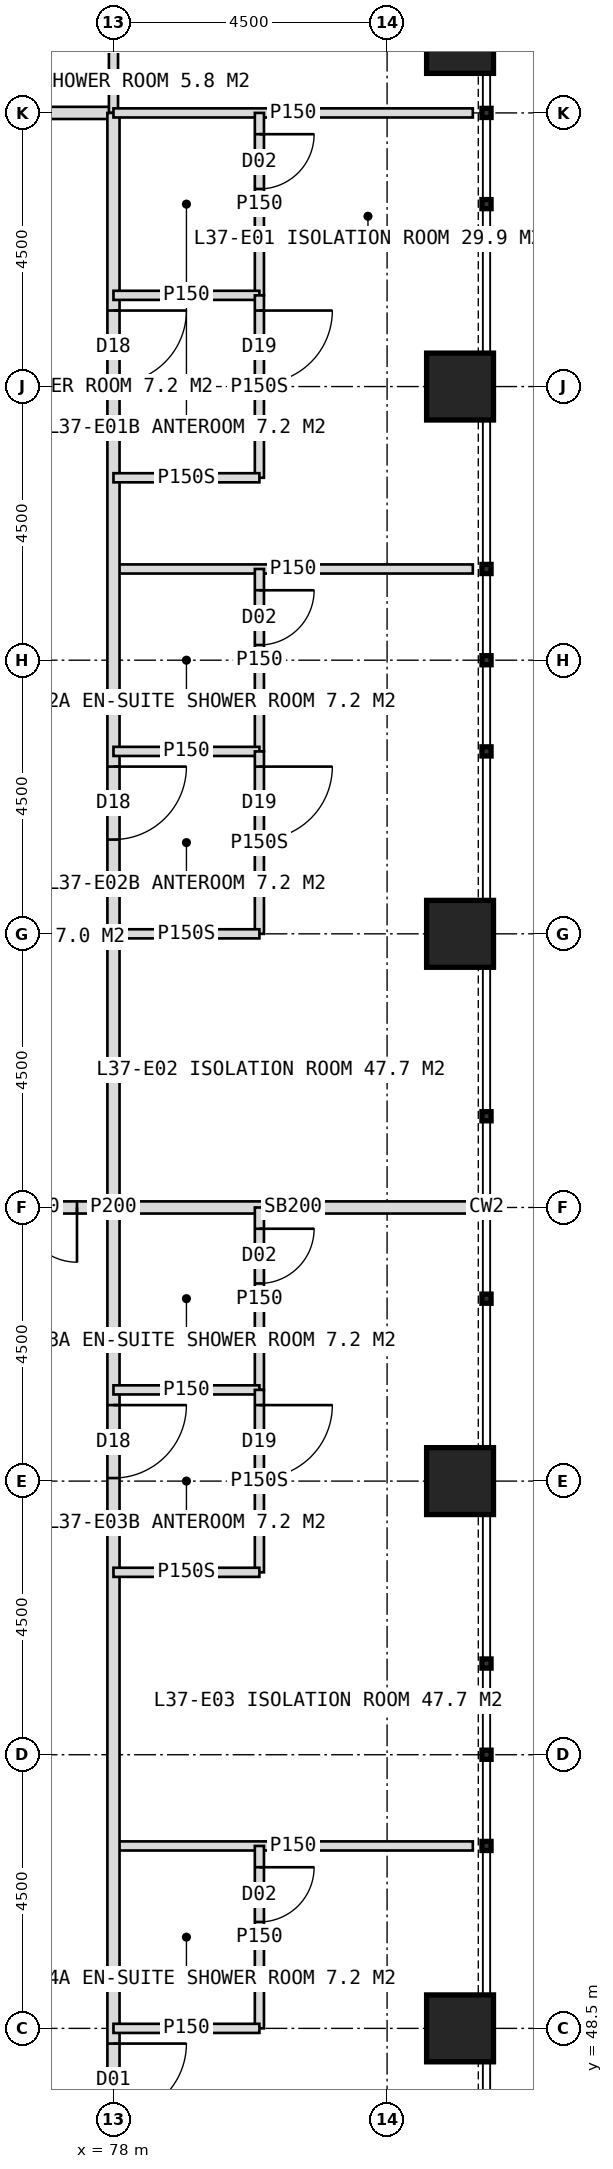
"""IFC4 building model, lengths in metres.
Left out: names, types, materials, properties, quantities, classifications, styles, units other than length and angle.
Written with IfcOpenShell. Run it as: python <this file> out.ifc"""

import sys

from ifc_helpers import new_model, si_unit, direction, frame, frame_2d, origin, origin_2d, place, context, subcontext, project, spatial, rectangle, hollow_rectangle, extrude, element, fill, save


model = new_model("IFC4")
c1 = context("Model", 3, precision=1e-05, world=origin(), true_north=direction((0.0, 1.0)))
c2 = subcontext(c1, "Body", "Model", "MODEL_VIEW")
j1 = project(units=[si_unit("LENGTHUNIT", "METRE"), si_unit("PLANEANGLEUNIT", "RADIAN")], contexts=[c1])
p1 = place(None, origin())
s1 = spatial("IfcSite", under=j1, at=p1, CompositionType="ELEMENT")
p2 = place(p1, origin())
s2 = spatial("IfcBuilding", under=s1, at=p2, CompositionType="ELEMENT")
p3 = place(p2, frame((0.0, 0.0, 156.0)))
s3 = spatial("IfcBuildingStorey", under=s2, at=p3, CompositionType="ELEMENT", Elevation=156.0)
for number, where, z_axis, x_axis in (
    (1, (83.7, 48.5, 0.0), (0.0, 0.0, 1.0), (1.0, 0.0, 0.0)),
    (2, (83.7, 57.5, 0.0), (0.0, 0.0, 1.0), (1.0, 0.0, 0.0)),
    (3, (83.7, 66.5, 0.0), (0.0, 0.0, 1.0), (1.0, 0.0, 0.0)),
    (4, (83.7, 75.5, 0.0), (0.0, 0.0, 1.0), (1.0, 0.0, 0.0)),
    (5, (83.7, 81.2, 0.0), (0.0, 0.0, 1.0), (1.0, 0.0, 0.0)),
):
    element("IfcColumn", number, at=place(p3, frame(where, z_axis=z_axis, x_axis=x_axis)), inside=s3, PredefinedType="COLUMN", context=c2, shape_type="SweptSolid", body=[
        extrude(hollow_rectangle(XDim=1.1, YDim=1.1, WallThickness=0.1, at=origin_2d()), origin(), (0.0, 0.0, 1.0), 4.0),
    ])
p4 = place(p3, frame((42.0, 80.0, 0.0), z_axis=(0.0, 0.0, 1.0), x_axis=(1.0, 0.0, 0.0)))
e6 = element("IfcWall", 6, at=p4, inside=s3, PredefinedType="PARTITIONING", context=c2, shape_type="SweptSolid", body=[
    extrude(rectangle(XDim=36.0, YDim=0.2, at=frame_2d((18.0, 0.0))), origin(), (0.0, 0.0, 1.0), 3.75),
])
p5 = place(p4, frame((3.25, 0.0, 0.0)))
e7 = element("IfcOpeningElement", 7, at=p5, cuts=e6, PredefinedType="OPENING", context=c2, shape_type="SweptSolid", body=[
    extrude(rectangle(XDim=1.2, YDim=2.2, at=frame_2d((0.6, 1.1))), frame((0.0, 0.11, 0.0), z_axis=(0.0, -1.0, 0.0), x_axis=(1.0, 0.0, 0.0)), (0.0, 0.0, 1.0), 0.22),
])
p6 = place(p4, frame((13.75, 0.0, 0.0)))
e8 = element("IfcOpeningElement", 8, at=p6, cuts=e6, PredefinedType="OPENING", context=c2, shape_type="SweptSolid", body=[
    extrude(rectangle(XDim=1.0, YDim=2.1, at=frame_2d((0.5, 1.05))), frame((0.0, 0.11, 0.0), z_axis=(0.0, -1.0, 0.0), x_axis=(1.0, 0.0, 0.0)), (0.0, 0.0, 1.0), 0.22),
])
p7 = place(p4, frame((22.15, 0.0, 0.0)))
e9 = element("IfcOpeningElement", 9, at=p7, cuts=e6, PredefinedType="OPENING", context=c2, shape_type="SweptSolid", body=[
    extrude(rectangle(XDim=1.2, YDim=2.2, at=frame_2d((0.6, 1.1))), frame((0.0, 0.11, 0.0), z_axis=(0.0, -1.0, 0.0), x_axis=(1.0, 0.0, 0.0)), (0.0, 0.0, 1.0), 0.22),
])
p8 = place(p3, frame((78.0, 80.0, 0.0), z_axis=(0.0, 0.0, 1.0), x_axis=(0.0, 1.0, 0.0)))
e10 = element("IfcWall", 10, at=p8, inside=s3, PredefinedType="PARTITIONING", context=c2, shape_type="SweptSolid", body=[
    extrude(rectangle(XDim=2.4, YDim=0.15, at=frame_2d((1.2, 0.0))), origin(), (0.0, 0.0, 1.0), 3.75),
])
p9 = place(p3, frame((78.0, 72.5, 0.0), z_axis=(0.0, 0.0, 1.0), x_axis=(1.0, 0.0, 0.0)))
e11 = element("IfcWall", 11, at=p9, inside=s3, PredefinedType="PARTITIONING", context=c2, shape_type="SweptSolid", body=[
    extrude(rectangle(XDim=5.91, YDim=0.15, at=frame_2d((2.955, 0.0))), origin(), (0.0, 0.0, 1.0), 3.75),
])
p10 = place(p3, frame((78.0, 62.0, 0.0), z_axis=(0.0, 0.0, 1.0), x_axis=(1.0, 0.0, 0.0)))
e12 = element("IfcWall", 12, at=p10, inside=s3, PredefinedType="SOLIDWALL", context=c2, shape_type="SweptSolid", body=[
    extrude(rectangle(XDim=5.91, YDim=0.2, at=frame_2d((2.955, 0.0))), origin(), (0.0, 0.0, 1.0), 2.95),
])
p11 = place(p3, frame((78.0, 51.5, 0.0), z_axis=(0.0, 0.0, 1.0), x_axis=(1.0, 0.0, 0.0)))
e13 = element("IfcWall", 13, at=p11, inside=s3, PredefinedType="PARTITIONING", context=c2, shape_type="SweptSolid", body=[
    extrude(rectangle(XDim=5.91, YDim=0.15, at=frame_2d((2.955, 0.0))), origin(), (0.0, 0.0, 1.0), 3.75),
])
p12 = place(p3, frame((78.0, 80.0, 0.0), z_axis=(0.0, 0.0, 1.0), x_axis=(0.0, -1.0, 0.0)))
e14 = element("IfcWall", 14, at=p12, inside=s3, PredefinedType="PARTITIONING", context=c2, shape_type="SweptSolid", body=[
    extrude(rectangle(XDim=36.0, YDim=0.2, at=frame_2d((18.0, 0.0))), origin(), (0.0, 0.0, 1.0), 3.75),
])
p13 = place(p12, frame((3.25, 0.0, 0.0)))
e15 = element("IfcOpeningElement", 15, at=p13, cuts=e14, PredefinedType="OPENING", context=c2, shape_type="SweptSolid", body=[
    extrude(rectangle(XDim=1.2, YDim=2.2, at=frame_2d((0.6, 1.1))), frame((0.0, 0.11, 0.0), z_axis=(0.0, -1.0, 0.0), x_axis=(1.0, 0.0, 0.0)), (0.0, 0.0, 1.0), 0.22),
])
p14 = place(p12, frame((10.75, 0.0, 0.0)))
e16 = element("IfcOpeningElement", 16, at=p14, cuts=e14, PredefinedType="OPENING", context=c2, shape_type="SweptSolid", body=[
    extrude(rectangle(XDim=1.2, YDim=2.2, at=frame_2d((0.6, 1.1))), frame((0.0, 0.11, 0.0), z_axis=(0.0, -1.0, 0.0), x_axis=(1.0, 0.0, 0.0)), (0.0, 0.0, 1.0), 0.22),
])
p15 = place(p12, frame((21.25, 0.0, 0.0)))
e17 = element("IfcOpeningElement", 17, at=p15, cuts=e14, PredefinedType="OPENING", context=c2, shape_type="SweptSolid", body=[
    extrude(rectangle(XDim=1.2, YDim=2.2, at=frame_2d((0.6, 1.1))), frame((0.0, 0.11, 0.0), z_axis=(0.0, -1.0, 0.0), x_axis=(1.0, 0.0, 0.0)), (0.0, 0.0, 1.0), 0.22),
])
p16 = place(p12, frame((31.75, 0.0, 0.0)))
e18 = element("IfcOpeningElement", 18, at=p16, cuts=e14, PredefinedType="OPENING", context=c2, shape_type="SweptSolid", body=[
    extrude(rectangle(XDim=1.2, YDim=2.2, at=frame_2d((0.6, 1.1))), frame((0.0, 0.11, 0.0), z_axis=(0.0, -1.0, 0.0), x_axis=(1.0, 0.0, 0.0)), (0.0, 0.0, 1.0), 0.22),
])
p17 = place(p3, frame((78.0, 80.0, 0.0), z_axis=(0.0, 0.0, 1.0), x_axis=(1.0, 0.0, 0.0)))
e19 = element("IfcWall", 19, at=p17, inside=s3, PredefinedType="PARTITIONING", context=c2, shape_type="SweptSolid", body=[
    extrude(rectangle(XDim=5.91, YDim=0.15, at=frame_2d((2.955, 0.0))), origin(), (0.0, 0.0, 1.0), 3.75),
])
p18 = place(p3, frame((80.4, 80.0, 0.0), z_axis=(0.0, 0.0, 1.0), x_axis=(0.0, -1.0, 0.0)))
e20 = element("IfcWall", 20, at=p18, inside=s3, PredefinedType="PARTITIONING", context=c2, shape_type="SweptSolid", body=[
    extrude(rectangle(XDim=3.0, YDim=0.15, at=frame_2d((1.5, 0.0))), origin(), (0.0, 0.0, 1.0), 3.75),
])
p19 = place(p18, frame((0.35, 0.0, 0.0)))
e21 = element("IfcOpeningElement", 21, at=p19, cuts=e20, PredefinedType="OPENING", context=c2, shape_type="SweptSolid", body=[
    extrude(rectangle(XDim=0.9, YDim=2.1, at=frame_2d((0.45, 1.05))), frame((0.0, 0.085, 0.0), z_axis=(0.0, -1.0, 0.0), x_axis=(1.0, 0.0, 0.0)), (0.0, 0.0, 1.0), 0.17),
])
p20 = place(p3, frame((78.0, 77.0, 0.0), z_axis=(0.0, 0.0, 1.0), x_axis=(1.0, 0.0, 0.0)))
e22 = element("IfcWall", 22, at=p20, inside=s3, PredefinedType="PARTITIONING", context=c2, shape_type="SweptSolid", body=[
    extrude(rectangle(XDim=2.4, YDim=0.15, at=frame_2d((1.2, 0.0))), origin(), (0.0, 0.0, 1.0), 3.75),
])
p21 = place(p3, frame((80.4, 77.0, 0.0), z_axis=(0.0, 0.0, 1.0), x_axis=(0.0, -1.0, 0.0)))
e23 = element("IfcWall", 23, at=p21, inside=s3, PredefinedType="PARTITIONING", context=c2, shape_type="SweptSolid", body=[
    extrude(rectangle(XDim=3.0, YDim=0.15, at=frame_2d((1.5, 0.0))), origin(), (0.0, 0.0, 1.0), 3.75),
])
p22 = place(p21, frame((0.25, 0.0, 0.0)))
e24 = element("IfcOpeningElement", 24, at=p22, cuts=e23, PredefinedType="OPENING", context=c2, shape_type="SweptSolid", body=[
    extrude(rectangle(XDim=1.2, YDim=2.2, at=frame_2d((0.6, 1.1))), frame((0.0, 0.085, 0.0), z_axis=(0.0, -1.0, 0.0), x_axis=(1.0, 0.0, 0.0)), (0.0, 0.0, 1.0), 0.17),
])
p23 = place(p3, frame((78.0, 74.0, 0.0), z_axis=(0.0, 0.0, 1.0), x_axis=(1.0, 0.0, 0.0)))
e25 = element("IfcWall", 25, at=p23, inside=s3, PredefinedType="PARTITIONING", context=c2, shape_type="SweptSolid", body=[
    extrude(rectangle(XDim=2.4, YDim=0.15, at=frame_2d((1.2, 0.0))), origin(), (0.0, 0.0, 1.0), 3.75),
])
p24 = place(p3, frame((80.4, 72.5, 0.0), z_axis=(0.0, 0.0, 1.0), x_axis=(0.0, -1.0, 0.0)))
e26 = element("IfcWall", 26, at=p24, inside=s3, PredefinedType="PARTITIONING", context=c2, shape_type="SweptSolid", body=[
    extrude(rectangle(XDim=3.0, YDim=0.15, at=frame_2d((1.5, 0.0))), origin(), (0.0, 0.0, 1.0), 3.75),
])
p25 = place(p24, frame((0.35, 0.0, 0.0)))
e27 = element("IfcOpeningElement", 27, at=p25, cuts=e26, PredefinedType="OPENING", context=c2, shape_type="SweptSolid", body=[
    extrude(rectangle(XDim=0.9, YDim=2.1, at=frame_2d((0.45, 1.05))), frame((0.0, 0.085, 0.0), z_axis=(0.0, -1.0, 0.0), x_axis=(1.0, 0.0, 0.0)), (0.0, 0.0, 1.0), 0.17),
])
p26 = place(p3, frame((78.0, 69.5, 0.0), z_axis=(0.0, 0.0, 1.0), x_axis=(1.0, 0.0, 0.0)))
e28 = element("IfcWall", 28, at=p26, inside=s3, PredefinedType="PARTITIONING", context=c2, shape_type="SweptSolid", body=[
    extrude(rectangle(XDim=2.4, YDim=0.15, at=frame_2d((1.2, 0.0))), origin(), (0.0, 0.0, 1.0), 3.75),
])
p27 = place(p3, frame((80.4, 69.5, 0.0), z_axis=(0.0, 0.0, 1.0), x_axis=(0.0, -1.0, 0.0)))
e29 = element("IfcWall", 29, at=p27, inside=s3, PredefinedType="PARTITIONING", context=c2, shape_type="SweptSolid", body=[
    extrude(rectangle(XDim=3.0, YDim=0.15, at=frame_2d((1.5, 0.0))), origin(), (0.0, 0.0, 1.0), 3.75),
])
p28 = place(p27, frame((0.25, 0.0, 0.0)))
e30 = element("IfcOpeningElement", 30, at=p28, cuts=e29, PredefinedType="OPENING", context=c2, shape_type="SweptSolid", body=[
    extrude(rectangle(XDim=1.2, YDim=2.2, at=frame_2d((0.6, 1.1))), frame((0.0, 0.085, 0.0), z_axis=(0.0, -1.0, 0.0), x_axis=(1.0, 0.0, 0.0)), (0.0, 0.0, 1.0), 0.17),
])
p29 = place(p3, frame((78.0, 66.5, 0.0), z_axis=(0.0, 0.0, 1.0), x_axis=(1.0, 0.0, 0.0)))
e31 = element("IfcWall", 31, at=p29, inside=s3, PredefinedType="PARTITIONING", context=c2, shape_type="SweptSolid", body=[
    extrude(rectangle(XDim=2.4, YDim=0.15, at=frame_2d((1.2, 0.0))), origin(), (0.0, 0.0, 1.0), 2.95),
])
p30 = place(p3, frame((80.4, 62.0, 0.0), z_axis=(0.0, 0.0, 1.0), x_axis=(0.0, -1.0, 0.0)))
e32 = element("IfcWall", 32, at=p30, inside=s3, PredefinedType="PARTITIONING", context=c2, shape_type="SweptSolid", body=[
    extrude(rectangle(XDim=3.0, YDim=0.15, at=frame_2d((1.5, 0.0))), origin(), (0.0, 0.0, 1.0), 3.75),
])
p31 = place(p30, frame((0.35, 0.0, 0.0)))
e33 = element("IfcOpeningElement", 33, at=p31, cuts=e32, PredefinedType="OPENING", context=c2, shape_type="SweptSolid", body=[
    extrude(rectangle(XDim=0.9, YDim=2.1, at=frame_2d((0.45, 1.05))), frame((0.0, 0.085, 0.0), z_axis=(0.0, -1.0, 0.0), x_axis=(1.0, 0.0, 0.0)), (0.0, 0.0, 1.0), 0.17),
])
p32 = place(p3, frame((78.0, 59.0, 0.0), z_axis=(0.0, 0.0, 1.0), x_axis=(1.0, 0.0, 0.0)))
e34 = element("IfcWall", 34, at=p32, inside=s3, PredefinedType="PARTITIONING", context=c2, shape_type="SweptSolid", body=[
    extrude(rectangle(XDim=2.4, YDim=0.15, at=frame_2d((1.2, 0.0))), origin(), (0.0, 0.0, 1.0), 3.75),
])
p33 = place(p3, frame((80.4, 59.0, 0.0), z_axis=(0.0, 0.0, 1.0), x_axis=(0.0, -1.0, 0.0)))
e35 = element("IfcWall", 35, at=p33, inside=s3, PredefinedType="PARTITIONING", context=c2, shape_type="SweptSolid", body=[
    extrude(rectangle(XDim=3.0, YDim=0.15, at=frame_2d((1.5, 0.0))), origin(), (0.0, 0.0, 1.0), 3.75),
])
p34 = place(p33, frame((0.25, 0.0, 0.0)))
e36 = element("IfcOpeningElement", 36, at=p34, cuts=e35, PredefinedType="OPENING", context=c2, shape_type="SweptSolid", body=[
    extrude(rectangle(XDim=1.2, YDim=2.2, at=frame_2d((0.6, 1.1))), frame((0.0, 0.085, 0.0), z_axis=(0.0, -1.0, 0.0), x_axis=(1.0, 0.0, 0.0)), (0.0, 0.0, 1.0), 0.17),
])
p35 = place(p3, frame((78.0, 56.0, 0.0), z_axis=(0.0, 0.0, 1.0), x_axis=(1.0, 0.0, 0.0)))
e37 = element("IfcWall", 37, at=p35, inside=s3, PredefinedType="PARTITIONING", context=c2, shape_type="SweptSolid", body=[
    extrude(rectangle(XDim=2.4, YDim=0.15, at=frame_2d((1.2, 0.0))), origin(), (0.0, 0.0, 1.0), 3.75),
])
p36 = place(p3, frame((80.4, 51.5, 0.0), z_axis=(0.0, 0.0, 1.0), x_axis=(0.0, -1.0, 0.0)))
e38 = element("IfcWall", 38, at=p36, inside=s3, PredefinedType="PARTITIONING", context=c2, shape_type="SweptSolid", body=[
    extrude(rectangle(XDim=3.0, YDim=0.15, at=frame_2d((1.5, 0.0))), origin(), (0.0, 0.0, 1.0), 3.75),
])
p37 = place(p36, frame((0.35, 0.0, 0.0)))
e39 = element("IfcOpeningElement", 39, at=p37, cuts=e38, PredefinedType="OPENING", context=c2, shape_type="SweptSolid", body=[
    extrude(rectangle(XDim=0.9, YDim=2.1, at=frame_2d((0.45, 1.05))), frame((0.0, 0.085, 0.0), z_axis=(0.0, -1.0, 0.0), x_axis=(1.0, 0.0, 0.0)), (0.0, 0.0, 1.0), 0.17),
])
p38 = place(p3, frame((78.0, 48.5, 0.0), z_axis=(0.0, 0.0, 1.0), x_axis=(1.0, 0.0, 0.0)))
e40 = element("IfcWall", 40, at=p38, inside=s3, PredefinedType="PARTITIONING", context=c2, shape_type="SweptSolid", body=[
    extrude(rectangle(XDim=2.4, YDim=0.15, at=frame_2d((1.2, 0.0))), origin(), (0.0, 0.0, 1.0), 2.95),
])
p39 = place(p3, frame((75.3, 62.0, 0.0), z_axis=(0.0, 0.0, 1.0), x_axis=(1.0, 0.0, 0.0)))
e41 = element("IfcWall", 41, at=p39, inside=s3, PredefinedType="SOLIDWALL", context=c2, shape_type="SweptSolid", body=[
    extrude(rectangle(XDim=2.7, YDim=0.2, at=frame_2d((1.35, 0.0))), origin(), (0.0, 0.0, 1.0), 2.95),
])
p40 = place(p39, frame((0.3, 0.0, 0.0)))
e42 = element("IfcOpeningElement", 42, at=p40, cuts=e41, PredefinedType="OPENING", context=c2, shape_type="SweptSolid", body=[
    extrude(rectangle(XDim=1.8, YDim=2.2, at=frame_2d((0.9, 1.1))), frame((0.0, 0.11, 0.0), z_axis=(0.0, -1.0, 0.0), x_axis=(1.0, 0.0, 0.0)), (0.0, 0.0, 1.0), 0.22),
])
p41 = place(p22, origin())
e43 = element("IfcDoor", 43, at=p41, inside=s3, OperationType="SINGLE_SWING_LEFT", PredefinedType="DOOR", context=c2, shape_type="SweptSolid", body=[
    extrude(rectangle(XDim=1.2, YDim=2.2, at=frame_2d((0.6, 1.1))), frame((0.0, 0.025, 0.0), z_axis=(0.0, -1.0, 0.0), x_axis=(1.0, 0.0, 0.0)), (0.0, 0.0, 1.0), 0.05),
])
fill(e24, e43)
p42 = place(p13, origin())
e44 = element("IfcDoor", 44, at=p42, inside=s3, OperationType="SINGLE_SWING_LEFT", PredefinedType="DOOR", context=c2, shape_type="SweptSolid", body=[
    extrude(rectangle(XDim=1.2, YDim=2.2, at=frame_2d((0.6, 1.1))), frame((0.0, 0.025, 0.0), z_axis=(0.0, -1.0, 0.0), x_axis=(1.0, 0.0, 0.0)), (0.0, 0.0, 1.0), 0.05),
])
fill(e15, e44)
p43 = place(p19, origin())
e45 = element("IfcDoor", 45, at=p43, inside=s3, OperationType="SINGLE_SWING_LEFT", PredefinedType="DOOR", context=c2, shape_type="SweptSolid", body=[
    extrude(rectangle(XDim=0.9, YDim=2.1, at=frame_2d((0.45, 1.05))), frame((0.0, 0.025, 0.0), z_axis=(0.0, -1.0, 0.0), x_axis=(1.0, 0.0, 0.0)), (0.0, 0.0, 1.0), 0.05),
])
fill(e21, e45)
p44 = place(p28, origin())
e46 = element("IfcDoor", 46, at=p44, inside=s3, OperationType="SINGLE_SWING_LEFT", PredefinedType="DOOR", context=c2, shape_type="SweptSolid", body=[
    extrude(rectangle(XDim=1.2, YDim=2.2, at=frame_2d((0.6, 1.1))), frame((0.0, 0.025, 0.0), z_axis=(0.0, -1.0, 0.0), x_axis=(1.0, 0.0, 0.0)), (0.0, 0.0, 1.0), 0.05),
])
fill(e30, e46)
p45 = place(p14, origin())
e47 = element("IfcDoor", 47, at=p45, inside=s3, OperationType="SINGLE_SWING_LEFT", PredefinedType="DOOR", context=c2, shape_type="SweptSolid", body=[
    extrude(rectangle(XDim=1.2, YDim=2.2, at=frame_2d((0.6, 1.1))), frame((0.0, 0.025, 0.0), z_axis=(0.0, -1.0, 0.0), x_axis=(1.0, 0.0, 0.0)), (0.0, 0.0, 1.0), 0.05),
])
fill(e16, e47)
p46 = place(p25, origin())
e48 = element("IfcDoor", 48, at=p46, inside=s3, OperationType="SINGLE_SWING_LEFT", PredefinedType="DOOR", context=c2, shape_type="SweptSolid", body=[
    extrude(rectangle(XDim=0.9, YDim=2.1, at=frame_2d((0.45, 1.05))), frame((0.0, 0.025, 0.0), z_axis=(0.0, -1.0, 0.0), x_axis=(1.0, 0.0, 0.0)), (0.0, 0.0, 1.0), 0.05),
])
fill(e27, e48)
p47 = place(p34, origin())
e49 = element("IfcDoor", 49, at=p47, inside=s3, OperationType="SINGLE_SWING_LEFT", PredefinedType="DOOR", context=c2, shape_type="SweptSolid", body=[
    extrude(rectangle(XDim=1.2, YDim=2.2, at=frame_2d((0.6, 1.1))), frame((0.0, 0.025, 0.0), z_axis=(0.0, -1.0, 0.0), x_axis=(1.0, 0.0, 0.0)), (0.0, 0.0, 1.0), 0.05),
])
fill(e36, e49)
p48 = place(p15, origin())
e50 = element("IfcDoor", 50, at=p48, inside=s3, OperationType="SINGLE_SWING_LEFT", PredefinedType="DOOR", context=c2, shape_type="SweptSolid", body=[
    extrude(rectangle(XDim=1.2, YDim=2.2, at=frame_2d((0.6, 1.1))), frame((0.0, 0.025, 0.0), z_axis=(0.0, -1.0, 0.0), x_axis=(1.0, 0.0, 0.0)), (0.0, 0.0, 1.0), 0.05),
])
fill(e17, e50)
p49 = place(p31, origin())
e51 = element("IfcDoor", 51, at=p49, inside=s3, OperationType="SINGLE_SWING_LEFT", PredefinedType="DOOR", context=c2, shape_type="SweptSolid", body=[
    extrude(rectangle(XDim=0.9, YDim=2.1, at=frame_2d((0.45, 1.05))), frame((0.0, 0.025, 0.0), z_axis=(0.0, -1.0, 0.0), x_axis=(1.0, 0.0, 0.0)), (0.0, 0.0, 1.0), 0.05),
])
fill(e33, e51)
p50 = place(p16, origin())
e52 = element("IfcDoor", 52, at=p50, inside=s3, OperationType="SINGLE_SWING_LEFT", PredefinedType="DOOR", context=c2, shape_type="SweptSolid", body=[
    extrude(rectangle(XDim=1.2, YDim=2.2, at=frame_2d((0.6, 1.1))), frame((0.0, 0.025, 0.0), z_axis=(0.0, -1.0, 0.0), x_axis=(1.0, 0.0, 0.0)), (0.0, 0.0, 1.0), 0.05),
])
fill(e18, e52)
p51 = place(p37, origin())
e53 = element("IfcDoor", 53, at=p51, inside=s3, OperationType="SINGLE_SWING_LEFT", PredefinedType="DOOR", context=c2, shape_type="SweptSolid", body=[
    extrude(rectangle(XDim=0.9, YDim=2.1, at=frame_2d((0.45, 1.05))), frame((0.0, 0.025, 0.0), z_axis=(0.0, -1.0, 0.0), x_axis=(1.0, 0.0, 0.0)), (0.0, 0.0, 1.0), 0.05),
])
fill(e39, e53)
p52 = place(p40, origin())
e54 = element("IfcDoor", 54, at=p52, inside=s3, OperationType="DOUBLE_DOOR_DOUBLE_SWING", PredefinedType="DOOR", context=c2, shape_type="SweptSolid", body=[
    extrude(rectangle(XDim=1.8, YDim=2.2, at=frame_2d((0.9, 1.1))), frame((0.0, 0.025, 0.0), z_axis=(0.0, -1.0, 0.0), x_axis=(1.0, 0.0, 0.0)), (0.0, 0.0, 1.0), 0.05),
])
fill(e42, e54)
save(model, sys.argv[1])
